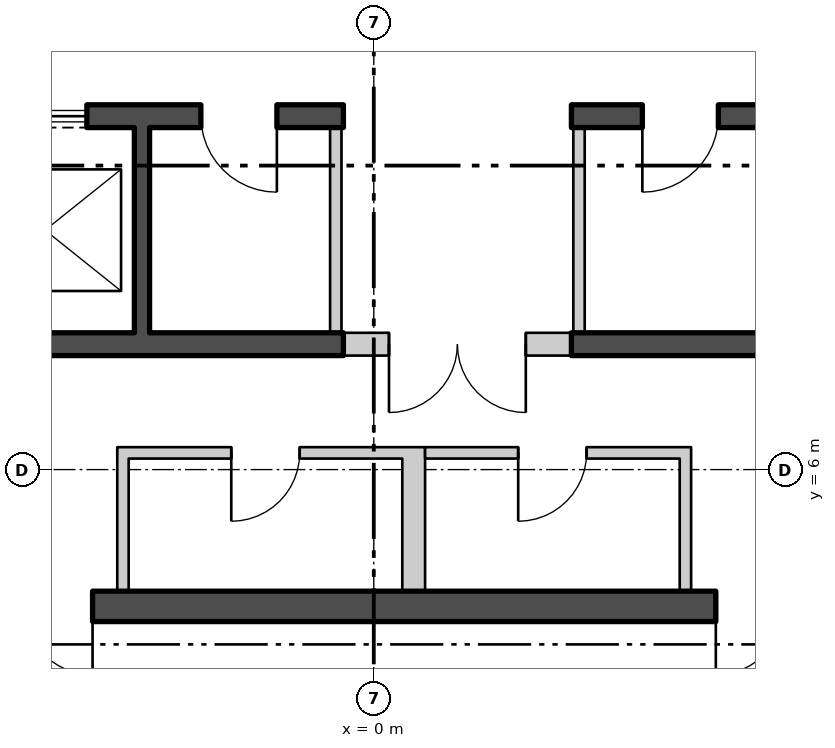
"""IFC4 building model, lengths in metres.
Left out: names, types, materials, properties, quantities, classifications, styles, units other than length and angle.
Written with IfcOpenShell. Run it as: python <this file> out.ifc"""

import sys

from ifc_helpers import new_model, si_unit, direction, frame, frame_2d, origin, place, context, subcontext, project, spatial, polyline, rectangle, outline, extrude, element, fill, save


model = new_model("IFC4")
c1 = context("Model", 3, precision=1e-05, world=origin(), true_north=direction((0.0, 1.0)))
c2 = subcontext(c1, "Body", "Model", "MODEL_VIEW")
j1 = project(units=[si_unit("LENGTHUNIT", "METRE"), si_unit("PLANEANGLEUNIT", "RADIAN")], contexts=[c1])
p1 = place(None, origin())
s1 = spatial("IfcSite", under=j1, at=p1, CompositionType="ELEMENT")
p2 = place(p1, origin())
s2 = spatial("IfcBuilding", under=s1, at=p2, CompositionType="ELEMENT")
p3 = place(p2, frame((0.0, 0.0, 268.8)))
s3 = spatial("IfcBuildingStorey", under=s2, at=p3, CompositionType="ELEMENT", Elevation=268.8)
p4 = place(p3, frame((-25.54, 15.35, -0.18), z_axis=(0.0, 0.0, 1.0), x_axis=(0.499999764979, -0.866025539474, 0.0)))
e1 = element("IfcWall", 1, at=p4, inside=s3, PredefinedType="SOLIDWALL", context=c2, shape_type="SweptSolid", body=[
    extrude(outline(polyline([(-0.13, -0.225), (45.87, -0.225), (45.61, 0.225), (0.13, 0.225), (-0.13, -0.225)])), origin(), (0.0, 0.0, 1.0), 3.68),
])
p5 = place(p4, frame((1.424, 0.0, 1.08)))
e2 = element("IfcOpeningElement", 2, at=p5, cuts=e1, PredefinedType="OPENING", context=c2, shape_type="SweptSolid", body=[
    extrude(rectangle(XDim=2.4, YDim=2.0, at=frame_2d((1.2, 1.0))), frame((0.0, 0.235, 0.0), z_axis=(0.0, -1.0, 0.0), x_axis=(1.0, 0.0, 0.0)), (0.0, 0.0, 1.0), 0.47),
])
p6 = place(p4, frame((5.893, 0.0, 1.08)))
e3 = element("IfcOpeningElement", 3, at=p6, cuts=e1, PredefinedType="OPENING", context=c2, shape_type="SweptSolid", body=[
    extrude(rectangle(XDim=2.4, YDim=2.0, at=frame_2d((1.2, 1.0))), frame((0.0, 0.235, 0.0), z_axis=(0.0, -1.0, 0.0), x_axis=(1.0, 0.0, 0.0)), (0.0, 0.0, 1.0), 0.47),
])
p7 = place(p4, frame((10.401, 0.0, 1.08)))
e4 = element("IfcOpeningElement", 4, at=p7, cuts=e1, PredefinedType="OPENING", context=c2, shape_type="SweptSolid", body=[
    extrude(rectangle(XDim=2.4, YDim=2.0, at=frame_2d((1.2, 1.0))), frame((0.0, 0.235, 0.0), z_axis=(0.0, -1.0, 0.0), x_axis=(1.0, 0.0, 0.0)), (0.0, 0.0, 1.0), 0.47),
])
p8 = place(p4, frame((14.909, 0.0, 1.08)))
e5 = element("IfcOpeningElement", 5, at=p8, cuts=e1, PredefinedType="OPENING", context=c2, shape_type="SweptSolid", body=[
    extrude(rectangle(XDim=2.4, YDim=2.0, at=frame_2d((1.2, 1.0))), frame((0.0, 0.235, 0.0), z_axis=(0.0, -1.0, 0.0), x_axis=(1.0, 0.0, 0.0)), (0.0, 0.0, 1.0), 0.47),
])
p9 = place(p4, frame((19.416, 0.0, 1.08)))
e6 = element("IfcOpeningElement", 6, at=p9, cuts=e1, PredefinedType="OPENING", context=c2, shape_type="SweptSolid", body=[
    extrude(rectangle(XDim=2.4, YDim=2.0, at=frame_2d((1.2, 1.0))), frame((0.0, 0.235, 0.0), z_axis=(0.0, -1.0, 0.0), x_axis=(1.0, 0.0, 0.0)), (0.0, 0.0, 1.0), 0.47),
])
p10 = place(p4, frame((23.924, 0.0, 1.08)))
e7 = element("IfcOpeningElement", 7, at=p10, cuts=e1, PredefinedType="OPENING", context=c2, shape_type="SweptSolid", body=[
    extrude(rectangle(XDim=2.4, YDim=2.0, at=frame_2d((1.2, 1.0))), frame((0.0, 0.235, 0.0), z_axis=(0.0, -1.0, 0.0), x_axis=(1.0, 0.0, 0.0)), (0.0, 0.0, 1.0), 0.47),
])
p11 = place(p4, frame((28.431, 0.0, 1.08)))
e8 = element("IfcOpeningElement", 8, at=p11, cuts=e1, PredefinedType="OPENING", context=c2, shape_type="SweptSolid", body=[
    extrude(rectangle(XDim=2.4, YDim=2.0, at=frame_2d((1.2, 1.0))), frame((0.0, 0.235, 0.0), z_axis=(0.0, -1.0, 0.0), x_axis=(1.0, 0.0, 0.0)), (0.0, 0.0, 1.0), 0.47),
])
p12 = place(p4, frame((32.939, 0.0, 1.08)))
e9 = element("IfcOpeningElement", 9, at=p12, cuts=e1, PredefinedType="OPENING", context=c2, shape_type="SweptSolid", body=[
    extrude(rectangle(XDim=2.4, YDim=2.0, at=frame_2d((1.2, 1.0))), frame((0.0, 0.235, 0.0), z_axis=(0.0, -1.0, 0.0), x_axis=(1.0, 0.0, 0.0)), (0.0, 0.0, 1.0), 0.47),
])
p13 = place(p4, frame((37.447, 0.0, 1.08)))
e10 = element("IfcOpeningElement", 10, at=p13, cuts=e1, PredefinedType="OPENING", context=c2, shape_type="SweptSolid", body=[
    extrude(rectangle(XDim=2.4, YDim=2.0, at=frame_2d((1.2, 1.0))), frame((0.0, 0.235, 0.0), z_axis=(0.0, -1.0, 0.0), x_axis=(1.0, 0.0, 0.0)), (0.0, 0.0, 1.0), 0.47),
])
p14 = place(p4, frame((41.916, 0.0, 1.08)))
e11 = element("IfcOpeningElement", 11, at=p14, cuts=e1, PredefinedType="OPENING", context=c2, shape_type="SweptSolid", body=[
    extrude(rectangle(XDim=2.4, YDim=2.0, at=frame_2d((1.2, 1.0))), frame((0.0, 0.235, 0.0), z_axis=(0.0, -1.0, 0.0), x_axis=(1.0, 0.0, 0.0)), (0.0, 0.0, 1.0), 0.47),
])
p15 = place(p3, frame((2.67, -24.262, -0.18), z_axis=(0.0, 0.0, 1.0), x_axis=(0.499999764979, 0.866025539474, 0.0)))
e12 = element("IfcWall", 12, at=p15, inside=s3, PredefinedType="SOLIDWALL", context=c2, shape_type="SweptSolid", body=[
    extrude(outline(polyline([(-0.13, -0.225), (45.87, -0.225), (45.61, 0.225), (0.13, 0.225), (-0.13, -0.225)])), origin(), (0.0, 0.0, 1.0), 3.68),
])
p16 = place(p15, frame((1.424, 0.0, 1.08)))
e13 = element("IfcOpeningElement", 13, at=p16, cuts=e12, PredefinedType="OPENING", context=c2, shape_type="SweptSolid", body=[
    extrude(rectangle(XDim=2.4, YDim=2.0, at=frame_2d((1.2, 1.0))), frame((0.0, 0.235, 0.0), z_axis=(0.0, -1.0, 0.0), x_axis=(1.0, 0.0, 0.0)), (0.0, 0.0, 1.0), 0.47),
])
p17 = place(p15, frame((5.893, 0.0, 1.08)))
e14 = element("IfcOpeningElement", 14, at=p17, cuts=e12, PredefinedType="OPENING", context=c2, shape_type="SweptSolid", body=[
    extrude(rectangle(XDim=2.4, YDim=2.0, at=frame_2d((1.2, 1.0))), frame((0.0, 0.235, 0.0), z_axis=(0.0, -1.0, 0.0), x_axis=(1.0, 0.0, 0.0)), (0.0, 0.0, 1.0), 0.47),
])
p18 = place(p15, frame((10.401, 0.0, 1.08)))
e15 = element("IfcOpeningElement", 15, at=p18, cuts=e12, PredefinedType="OPENING", context=c2, shape_type="SweptSolid", body=[
    extrude(rectangle(XDim=2.4, YDim=2.0, at=frame_2d((1.2, 1.0))), frame((0.0, 0.235, 0.0), z_axis=(0.0, -1.0, 0.0), x_axis=(1.0, 0.0, 0.0)), (0.0, 0.0, 1.0), 0.47),
])
p19 = place(p15, frame((14.909, 0.0, 1.08)))
e16 = element("IfcOpeningElement", 16, at=p19, cuts=e12, PredefinedType="OPENING", context=c2, shape_type="SweptSolid", body=[
    extrude(rectangle(XDim=2.4, YDim=2.0, at=frame_2d((1.2, 1.0))), frame((0.0, 0.235, 0.0), z_axis=(0.0, -1.0, 0.0), x_axis=(1.0, 0.0, 0.0)), (0.0, 0.0, 1.0), 0.47),
])
p20 = place(p15, frame((23.924, 0.0, 1.08)))
e17 = element("IfcOpeningElement", 17, at=p20, cuts=e12, PredefinedType="OPENING", context=c2, shape_type="SweptSolid", body=[
    extrude(rectangle(XDim=2.4, YDim=2.0, at=frame_2d((1.2, 1.0))), frame((0.0, 0.235, 0.0), z_axis=(0.0, -1.0, 0.0), x_axis=(1.0, 0.0, 0.0)), (0.0, 0.0, 1.0), 0.47),
])
p21 = place(p15, frame((28.431, 0.0, 1.08)))
e18 = element("IfcOpeningElement", 18, at=p21, cuts=e12, PredefinedType="OPENING", context=c2, shape_type="SweptSolid", body=[
    extrude(rectangle(XDim=2.4, YDim=2.0, at=frame_2d((1.2, 1.0))), frame((0.0, 0.235, 0.0), z_axis=(0.0, -1.0, 0.0), x_axis=(1.0, 0.0, 0.0)), (0.0, 0.0, 1.0), 0.47),
])
p22 = place(p15, frame((32.939, 0.0, 1.08)))
e19 = element("IfcOpeningElement", 19, at=p22, cuts=e12, PredefinedType="OPENING", context=c2, shape_type="SweptSolid", body=[
    extrude(rectangle(XDim=2.4, YDim=2.0, at=frame_2d((1.2, 1.0))), frame((0.0, 0.235, 0.0), z_axis=(0.0, -1.0, 0.0), x_axis=(1.0, 0.0, 0.0)), (0.0, 0.0, 1.0), 0.47),
])
p23 = place(p15, frame((37.447, 0.0, 1.08)))
e20 = element("IfcOpeningElement", 20, at=p23, cuts=e12, PredefinedType="OPENING", context=c2, shape_type="SweptSolid", body=[
    extrude(rectangle(XDim=2.4, YDim=2.0, at=frame_2d((1.2, 1.0))), frame((0.0, 0.235, 0.0), z_axis=(0.0, -1.0, 0.0), x_axis=(1.0, 0.0, 0.0)), (0.0, 0.0, 1.0), 0.47),
])
p24 = place(p15, frame((41.916, 0.0, 1.08)))
e21 = element("IfcOpeningElement", 21, at=p24, cuts=e12, PredefinedType="OPENING", context=c2, shape_type="SweptSolid", body=[
    extrude(rectangle(XDim=2.4, YDim=2.0, at=frame_2d((1.2, 1.0))), frame((0.0, 0.235, 0.0), z_axis=(0.0, -1.0, 0.0), x_axis=(1.0, 0.0, 0.0)), (0.0, 0.0, 1.0), 0.47),
])
p25 = place(p3, frame((-14.5, 4.2, 0.0), z_axis=(0.0, 0.0, 1.0), x_axis=(1.0, 0.0, 0.0)))
e22 = element("IfcWall", 22, at=p25, inside=s3, PredefinedType="SHEAR", context=c2, shape_type="SweptSolid", body=[
    extrude(rectangle(XDim=29.0, YDim=0.4, at=frame_2d((14.5, 0.0))), origin(), (0.0, 0.0, 1.0), 3.7),
])
p26 = place(p25, frame((9.0, 0.0, 0.0)))
e23 = element("IfcOpeningElement", 23, at=p26, cuts=e22, PredefinedType="OPENING", context=c2, shape_type="SweptSolid", body=[
    extrude(rectangle(XDim=1.8, YDim=2.4, at=frame_2d((0.9, 1.2))), frame((0.0, 0.21, 0.0), z_axis=(0.0, -1.0, 0.0), x_axis=(1.0, 0.0, 0.0)), (0.0, 0.0, 1.0), 0.42),
])
p27 = place(p25, frame((19.0, 0.0, 0.0)))
e24 = element("IfcOpeningElement", 24, at=p27, cuts=e22, PredefinedType="OPENING", context=c2, shape_type="SweptSolid", body=[
    extrude(rectangle(XDim=1.8, YDim=2.4, at=frame_2d((0.9, 1.2))), frame((0.0, 0.21, 0.0), z_axis=(0.0, -1.0, 0.0), x_axis=(1.0, 0.0, 0.0)), (0.0, 0.0, 1.0), 0.42),
])
p28 = place(p3, frame((-10.7, 10.65, 0.0), z_axis=(0.0, 0.0, 1.0), x_axis=(1.0, 0.0, 0.0)))
e25 = element("IfcWall", 25, at=p28, inside=s3, PredefinedType="SHEAR", context=c2, shape_type="SweptSolid", body=[
    extrude(rectangle(XDim=10.3, YDim=0.3, at=frame_2d((5.15, 0.0))), origin(), (0.0, 0.0, 1.0), 3.7),
])
p29 = place(p28, frame((0.675, 0.0, 0.0)))
e26 = element("IfcOpeningElement", 26, at=p29, cuts=e25, PredefinedType="OPENING", context=c2, shape_type="SweptSolid", body=[
    extrude(rectangle(XDim=1.1, YDim=2.1, at=frame_2d((0.55, 1.05))), frame((0.0, 0.16, 0.0), z_axis=(0.0, -1.0, 0.0), x_axis=(1.0, 0.0, 0.0)), (0.0, 0.0, 1.0), 0.32),
])
p30 = place(p28, frame((3.275, 0.0, 0.0)))
e27 = element("IfcOpeningElement", 27, at=p30, cuts=e25, PredefinedType="OPENING", context=c2, shape_type="SweptSolid", body=[
    extrude(rectangle(XDim=1.1, YDim=2.1, at=frame_2d((0.55, 1.05))), frame((0.0, 0.16, 0.0), z_axis=(0.0, -1.0, 0.0), x_axis=(1.0, 0.0, 0.0)), (0.0, 0.0, 1.0), 0.32),
])
p31 = place(p28, frame((5.825, 0.0, 0.0)))
e28 = element("IfcOpeningElement", 28, at=p31, cuts=e25, PredefinedType="OPENING", context=c2, shape_type="SweptSolid", body=[
    extrude(rectangle(XDim=1.1, YDim=2.1, at=frame_2d((0.55, 1.05))), frame((0.0, 0.16, 0.0), z_axis=(0.0, -1.0, 0.0), x_axis=(1.0, 0.0, 0.0)), (0.0, 0.0, 1.0), 0.32),
])
p32 = place(p28, frame((8.425, 0.0, 0.0)))
e29 = element("IfcOpeningElement", 29, at=p32, cuts=e25, PredefinedType="OPENING", context=c2, shape_type="SweptSolid", body=[
    extrude(rectangle(XDim=1.0, YDim=2.1, at=frame_2d((0.5, 1.05))), frame((0.0, 0.16, 0.0), z_axis=(0.0, -1.0, 0.0), x_axis=(1.0, 0.0, 0.0)), (0.0, 0.0, 1.0), 0.32),
])
p33 = place(p3, frame((-10.7, 7.65, 0.0), z_axis=(0.0, 0.0, 1.0), x_axis=(1.0, 0.0, 0.0)))
e30 = element("IfcWall", 30, at=p33, inside=s3, PredefinedType="SHEAR", context=c2, shape_type="SweptSolid", body=[
    extrude(rectangle(XDim=10.3, YDim=0.3, at=frame_2d((5.15, 0.0))), origin(), (0.0, 0.0, 1.0), 3.7),
])
p34 = place(p3, frame((2.6, 10.65, 0.0), z_axis=(0.0, 0.0, 1.0), x_axis=(1.0, 0.0, 0.0)))
e31 = element("IfcWall", 31, at=p34, inside=s3, PredefinedType="SHEAR", context=c2, shape_type="SweptSolid", body=[
    extrude(rectangle(XDim=8.1, YDim=0.3, at=frame_2d((4.05, 0.0))), origin(), (0.0, 0.0, 1.0), 3.7),
])
p35 = place(p34, frame((0.933, 0.0, 0.0)))
e32 = element("IfcOpeningElement", 32, at=p35, cuts=e31, PredefinedType="OPENING", context=c2, shape_type="SweptSolid", body=[
    extrude(rectangle(XDim=1.0, YDim=2.1, at=frame_2d((0.5, 1.05))), frame((0.0, 0.16, 0.0), z_axis=(0.0, -1.0, 0.0), x_axis=(1.0, 0.0, 0.0)), (0.0, 0.0, 1.0), 0.32),
])
p36 = place(p34, frame((3.6, 0.0, 0.0)))
e33 = element("IfcOpeningElement", 33, at=p36, cuts=e31, PredefinedType="OPENING", context=c2, shape_type="SweptSolid", body=[
    extrude(rectangle(XDim=1.0, YDim=2.1, at=frame_2d((0.5, 1.05))), frame((0.0, 0.16, 0.0), z_axis=(0.0, -1.0, 0.0), x_axis=(1.0, 0.0, 0.0)), (0.0, 0.0, 1.0), 0.32),
])
p37 = place(p34, frame((6.317, 0.0, 0.0)))
e34 = element("IfcOpeningElement", 34, at=p37, cuts=e31, PredefinedType="OPENING", context=c2, shape_type="SweptSolid", body=[
    extrude(rectangle(XDim=1.0, YDim=2.1, at=frame_2d((0.5, 1.05))), frame((0.0, 0.16, 0.0), z_axis=(0.0, -1.0, 0.0), x_axis=(1.0, 0.0, 0.0)), (0.0, 0.0, 1.0), 0.32),
])
p38 = place(p3, frame((2.6, 7.65, 0.0), z_axis=(0.0, 0.0, 1.0), x_axis=(1.0, 0.0, 0.0)))
e35 = element("IfcWall", 35, at=p38, inside=s3, PredefinedType="SHEAR", context=c2, shape_type="SweptSolid", body=[
    extrude(rectangle(XDim=8.1, YDim=0.3, at=frame_2d((4.05, 0.0))), origin(), (0.0, 0.0, 1.0), 3.7),
])
p39 = place(p3, frame((-3.05, 7.8, 0.0), z_axis=(0.0, 0.0, 1.0), x_axis=(0.0, 1.0, 0.0)))
e36 = element("IfcWall", 36, at=p39, inside=s3, PredefinedType="SHEAR", context=c2, shape_type="SweptSolid", body=[
    extrude(rectangle(XDim=2.7, YDim=0.2, at=frame_2d((1.35, 0.0))), origin(), (0.0, 0.0, 1.0), 3.7),
])
for number, where, z_axis, x_axis in (
    (37, (-0.5, 7.8, 0.0), (0.0, 0.0, 1.0), (0.0, 1.0, 0.0)),
    (38, (2.7, 7.8, 0.0), (0.0, 0.0, 1.0), (0.0, 1.0, 0.0)),
):
    element("IfcWall", number, at=place(p3, frame(where, z_axis=z_axis, x_axis=x_axis)), inside=s3, PredefinedType="PARTITIONING", context=c2, shape_type="SweptSolid", body=[
        extrude(rectangle(XDim=2.7, YDim=0.15, at=frame_2d((1.35, 0.0))), origin(), (0.0, 0.0, 1.0), 3.7),
    ])
for number, where, z_axis, x_axis in (
    (39, (-3.3, 4.4, 0.0), (0.0, 0.0, 1.0), (0.0, 1.0, 0.0)),
    (40, (0.45, 4.4, 0.0), (0.0, 0.0, 1.0), (0.0, 1.0, 0.0)),
):
    element("IfcWall", number, at=place(p3, frame(where, z_axis=z_axis, x_axis=x_axis)), inside=s3, PredefinedType="PARTITIONING", context=c2, shape_type="SweptSolid", body=[
        extrude(rectangle(XDim=1.895, YDim=0.15, at=frame_2d((0.948, 0.0))), origin(), (0.0, 0.0, 1.0), 3.7),
    ])
p40 = place(p3, frame((-3.225, 6.22, 0.0), z_axis=(0.0, 0.0, 1.0), x_axis=(1.0, 0.0, 0.0)))
e41 = element("IfcWall", 41, at=p40, inside=s3, PredefinedType="PARTITIONING", context=c2, shape_type="SweptSolid", body=[
    extrude(rectangle(XDim=3.6, YDim=0.15, at=frame_2d((1.8, 0.0))), origin(), (0.0, 0.0, 1.0), 3.7),
])
p41 = place(p40, frame((1.35, 0.0, 0.0)))
e42 = element("IfcOpeningElement", 42, at=p41, cuts=e41, PredefinedType="OPENING", context=c2, shape_type="SweptSolid", body=[
    extrude(rectangle(XDim=0.9, YDim=2.1, at=frame_2d((0.45, 1.05))), frame((0.0, 0.085, 0.0), z_axis=(0.0, -1.0, 0.0), x_axis=(1.0, 0.0, 0.0)), (0.0, 0.0, 1.0), 0.17),
])
for number, where, z_axis, x_axis in (
    (43, (0.6, 4.4, 0.0), (0.0, 0.0, 1.0), (0.0, 1.0, 0.0)),
    (44, (4.1, 4.4, 0.0), (0.0, 0.0, 1.0), (0.0, 1.0, 0.0)),
):
    element("IfcWall", number, at=place(p3, frame(where, z_axis=z_axis, x_axis=x_axis)), inside=s3, PredefinedType="PARTITIONING", context=c2, shape_type="SweptSolid", body=[
        extrude(rectangle(XDim=1.895, YDim=0.15, at=frame_2d((0.948, 0.0))), origin(), (0.0, 0.0, 1.0), 3.7),
    ])
p42 = place(p3, frame((0.675, 6.22, 0.0), z_axis=(0.0, 0.0, 1.0), x_axis=(1.0, 0.0, 0.0)))
e45 = element("IfcWall", 45, at=p42, inside=s3, PredefinedType="PARTITIONING", context=c2, shape_type="SweptSolid", body=[
    extrude(rectangle(XDim=3.35, YDim=0.15, at=frame_2d((1.675, 0.0))), origin(), (0.0, 0.0, 1.0), 3.7),
])
p43 = place(p42, frame((1.225, 0.0, 0.0)))
e46 = element("IfcOpeningElement", 46, at=p43, cuts=e45, PredefinedType="OPENING", context=c2, shape_type="SweptSolid", body=[
    extrude(rectangle(XDim=0.9, YDim=2.1, at=frame_2d((0.45, 1.05))), frame((0.0, 0.085, 0.0), z_axis=(0.0, -1.0, 0.0), x_axis=(1.0, 0.0, 0.0)), (0.0, 0.0, 1.0), 0.17),
])
p44 = place(p3, frame((-0.4, 7.65, 0.0), z_axis=(0.0, 0.0, 1.0), x_axis=(1.0, 0.0, 0.0)))
e47 = element("IfcWall", 47, at=p44, inside=s3, PredefinedType="PARTITIONING", context=c2, shape_type="SweptSolid", body=[
    extrude(rectangle(XDim=3.0, YDim=0.3, at=frame_2d((1.5, 0.0))), origin(), (0.0, 0.0, 1.0), 3.7),
])
p45 = place(p44, frame((0.6, 0.0, 0.0)))
e48 = element("IfcOpeningElement", 48, at=p45, cuts=e47, PredefinedType="OPENING", context=c2, shape_type="SweptSolid", body=[
    extrude(rectangle(XDim=1.8, YDim=2.4, at=frame_2d((0.9, 1.2))), frame((0.0, 0.16, 0.0), z_axis=(0.0, -1.0, 0.0), x_axis=(1.0, 0.0, 0.0)), (0.0, 0.0, 1.0), 0.32),
])
p46 = place(p31, origin())
e49 = element("IfcDoor", 49, at=p46, inside=s3, OperationType="SLIDING_TO_LEFT", PredefinedType="DOOR", context=c2, shape_type="SweptSolid", body=[
    extrude(rectangle(XDim=1.1, YDim=2.1, at=frame_2d((0.55, 1.05))), frame((0.0, 0.025, 0.0), z_axis=(0.0, -1.0, 0.0), x_axis=(1.0, 0.0, 0.0)), (0.0, 0.0, 1.0), 0.05),
])
fill(e28, e49)
p47 = place(p32, origin())
e50 = element("IfcDoor", 50, at=p47, inside=s3, OperationType="SINGLE_SWING_RIGHT", PredefinedType="DOOR", context=c2, shape_type="SweptSolid", body=[
    extrude(rectangle(XDim=1.0, YDim=2.1, at=frame_2d((0.5, 1.05))), frame((0.0, 0.025, 0.0), z_axis=(0.0, -1.0, 0.0), x_axis=(1.0, 0.0, 0.0)), (0.0, 0.0, 1.0), 0.05),
])
fill(e29, e50)
p48 = place(p35, origin())
e51 = element("IfcDoor", 51, at=p48, inside=s3, OperationType="SINGLE_SWING_LEFT", PredefinedType="DOOR", context=c2, shape_type="SweptSolid", body=[
    extrude(rectangle(XDim=1.0, YDim=2.1, at=frame_2d((0.5, 1.05))), frame((0.0, 0.025, 0.0), z_axis=(0.0, -1.0, 0.0), x_axis=(1.0, 0.0, 0.0)), (0.0, 0.0, 1.0), 0.05),
])
fill(e32, e51)
p49 = place(p41, origin())
e52 = element("IfcDoor", 52, at=p49, inside=s3, OperationType="SINGLE_SWING_LEFT", PredefinedType="DOOR", context=c2, shape_type="SweptSolid", body=[
    extrude(rectangle(XDim=0.9, YDim=2.1, at=frame_2d((0.45, 1.05))), frame((0.0, 0.025, 0.0), z_axis=(0.0, -1.0, 0.0), x_axis=(1.0, 0.0, 0.0)), (0.0, 0.0, 1.0), 0.05),
])
fill(e42, e52)
p50 = place(p43, origin())
e53 = element("IfcDoor", 53, at=p50, inside=s3, OperationType="SINGLE_SWING_LEFT", PredefinedType="DOOR", context=c2, shape_type="SweptSolid", body=[
    extrude(rectangle(XDim=0.9, YDim=2.1, at=frame_2d((0.45, 1.05))), frame((0.0, 0.025, 0.0), z_axis=(0.0, -1.0, 0.0), x_axis=(1.0, 0.0, 0.0)), (0.0, 0.0, 1.0), 0.05),
])
fill(e46, e53)
p51 = place(p45, origin())
e54 = element("IfcDoor", 54, at=p51, inside=s3, OperationType="DOUBLE_DOOR_SINGLE_SWING", PredefinedType="DOOR", context=c2, shape_type="SweptSolid", body=[
    extrude(rectangle(XDim=1.8, YDim=2.4, at=frame_2d((0.9, 1.2))), frame((0.0, 0.025, 0.0), z_axis=(0.0, -1.0, 0.0), x_axis=(1.0, 0.0, 0.0)), (0.0, 0.0, 1.0), 0.05),
])
fill(e48, e54)
p52 = place(p26, origin())
e55 = element("IfcDoor", 55, at=p52, inside=s3, OperationType="DOUBLE_DOOR_SINGLE_SWING", PredefinedType="DOOR", context=c2, shape_type="SweptSolid", body=[
    extrude(rectangle(XDim=1.8, YDim=2.4, at=frame_2d((0.9, 1.2))), frame((0.0, 0.025, 0.0), z_axis=(0.0, -1.0, 0.0), x_axis=(1.0, 0.0, 0.0)), (0.0, 0.0, 1.0), 0.05),
])
fill(e23, e55)
p53 = place(p27, origin())
e56 = element("IfcDoor", 56, at=p53, inside=s3, OperationType="DOUBLE_DOOR_SINGLE_SWING", PredefinedType="DOOR", context=c2, shape_type="SweptSolid", body=[
    extrude(rectangle(XDim=1.8, YDim=2.4, at=frame_2d((0.9, 1.2))), frame((0.0, 0.025, 0.0), z_axis=(0.0, -1.0, 0.0), x_axis=(1.0, 0.0, 0.0)), (0.0, 0.0, 1.0), 0.05),
])
fill(e24, e56)
save(model, sys.argv[1])
